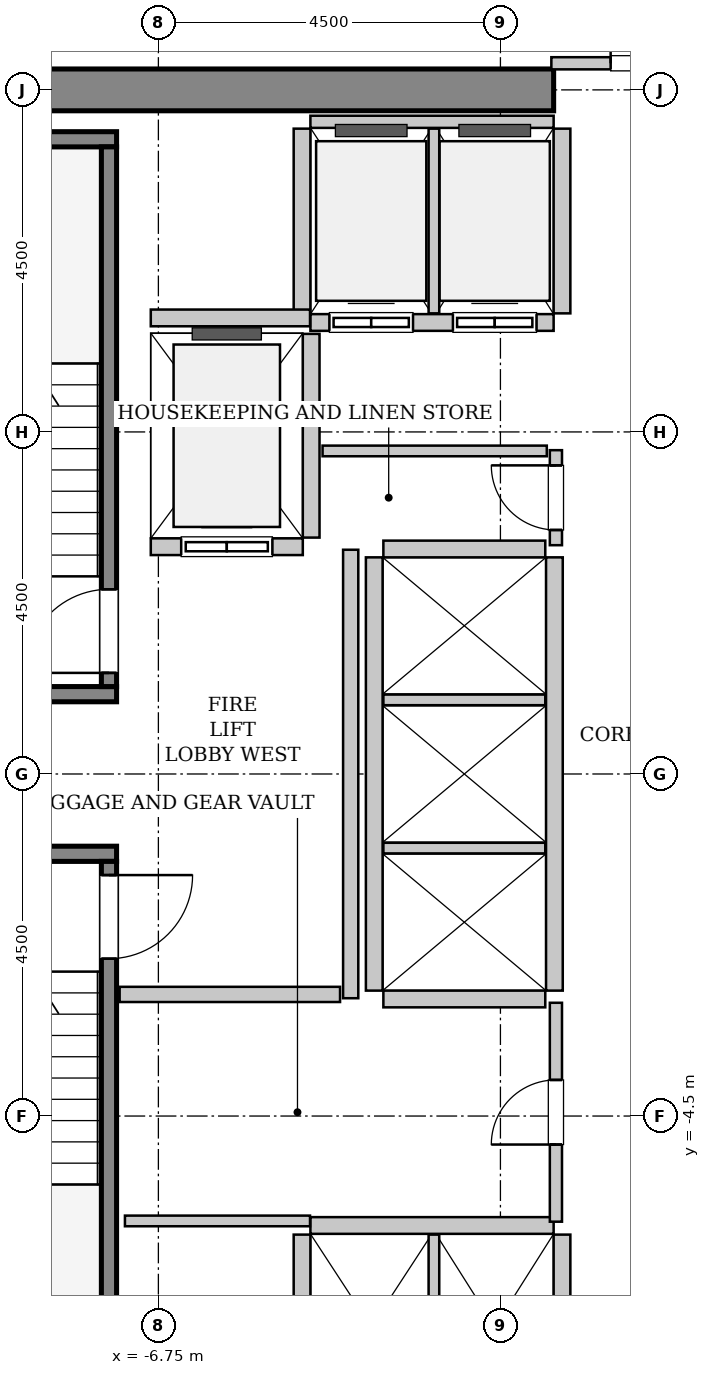
"""IFC4 building model, lengths in metres.
Left out: names, types, materials, properties, quantities, classifications, styles, units other than length and angle.
Written with IfcOpenShell. Run it as: python <this file> out.ifc"""

import sys

from ifc_helpers import new_model, si_unit, direction, frame, frame_2d, origin, place, context, subcontext, project, spatial, rectangle, extrude, source, transform, mapped, element, fill, save


model = new_model("IFC4")
c1 = context("Model", 3, precision=1e-05, world=origin(), true_north=direction((0.0, 1.0)))
c2 = subcontext(c1, "Body", "Model", "MODEL_VIEW")
j1 = project(units=[si_unit("LENGTHUNIT", "METRE"), si_unit("PLANEANGLEUNIT", "RADIAN")], contexts=[c1])
p1 = place(None, origin())
s1 = spatial("IfcSite", under=j1, at=p1, CompositionType="ELEMENT")
p2 = place(p1, origin())
s2 = spatial("IfcBuilding", under=s1, at=p2, CompositionType="ELEMENT")
p3 = place(p2, frame((0.0, 0.0, 128.8)))
s3 = spatial("IfcBuildingStorey", under=s2, at=p3, CompositionType="ELEMENT", Elevation=128.8)
m1 = source(origin(), c2, "Body", "SweptSolid", [
    extrude(rectangle(XDim=9.975, YDim=0.55, at=frame_2d((4.987, 0.0))), origin(), (0.0, 0.0, 1.0), 3.8),
])
p4 = place(p3, frame((-11.525, 9.0, 0.0), z_axis=(0.0, 0.0, 1.0), x_axis=(1.0, 0.0, 0.0)))
e1 = element("IfcWall", 1, at=p4, inside=s3, PredefinedType="SHEAR", context=c2, shape_type="MappedRepresentation", body=[
    mapped(m1, transform((0.0, 0.0, 0.0), x_axis=(1.0, 0.0, 0.0), y_axis=(0.0, 1.0, 0.0), z_axis=(0.0, 0.0, 1.0), scale=1.0)),
])
m2 = source(origin(), c2, "Body", "SweptSolid", [
    extrude(rectangle(XDim=3.4, YDim=0.2, at=frame_2d((1.7, 0.0))), origin(), (0.0, 0.0, 1.0), 3.8),
])
p5 = place(p3, frame((-7.3, 1.05, 0.0), z_axis=(0.0, 0.0, 1.0), x_axis=(-1.0, 0.0, 0.0)))
e2 = element("IfcWall", 2, at=p5, inside=s3, PredefinedType="SOLIDWALL", context=c2, shape_type="MappedRepresentation", body=[
    mapped(m2, transform((0.0, 0.0, 0.0), x_axis=(1.0, 0.0, 0.0), y_axis=(0.0, 1.0, 0.0), z_axis=(0.0, 0.0, 1.0), scale=1.0)),
])
m3 = source(origin(), c2, "Body", "SweptSolid", [
    extrude(rectangle(XDim=3.68, YDim=0.2, at=frame_2d((1.84, 0.0))), origin(), (0.0, 0.0, 1.0), 3.8),
])
p6 = place(p3, frame((-7.3, 8.35, 0.0), z_axis=(0.0, 0.0, 1.0), x_axis=(-1.0, 0.0, 0.0)))
e3 = element("IfcWall", 3, at=p6, inside=s3, PredefinedType="SOLIDWALL", context=c2, shape_type="MappedRepresentation", body=[
    mapped(m3, transform((0.0, 0.0, 0.0), x_axis=(1.0, 0.0, 0.0), y_axis=(0.0, 1.0, 0.0), z_axis=(0.0, 0.0, 1.0), scale=1.0)),
])
m4 = source(origin(), c2, "Body", "SweptSolid", [
    extrude(rectangle(XDim=7.1, YDim=0.2, at=frame_2d((3.55, 0.0))), origin(), (0.0, 0.0, 1.0), 3.8),
])
p7 = place(p3, frame((-7.4, 1.15, 0.0), z_axis=(0.0, 0.0, 1.0), x_axis=(0.0, 1.0, 0.0)))
e4 = element("IfcWall", 4, at=p7, inside=s3, PredefinedType="SOLIDWALL", context=c2, shape_type="MappedRepresentation", body=[
    mapped(m4, transform((0.0, 0.0, 0.0), x_axis=(1.0, 0.0, 0.0), y_axis=(0.0, 1.0, 0.0), z_axis=(0.0, 0.0, 1.0), scale=1.0)),
])
p8 = place(p7, frame((0.18, 0.0, 0.0)))
e5 = element("IfcOpeningElement", 5, at=p8, cuts=e4, PredefinedType="OPENING", context=c2, shape_type="SweptSolid", body=[
    extrude(rectangle(XDim=1.1, YDim=2.15, at=frame_2d((0.55, 1.075))), frame((0.0, 0.11, 0.0), z_axis=(0.0, -1.0, 0.0), x_axis=(1.0, 0.0, 0.0)), (0.0, 0.0, 1.0), 0.22),
])
p9 = place(p3, frame((-10.7, -1.05, 0.0), z_axis=(0.0, 0.0, 1.0), x_axis=(1.0, 0.0, 0.0)))
e6 = element("IfcWall", 6, at=p9, inside=s3, PredefinedType="SOLIDWALL", context=c2, shape_type="MappedRepresentation", body=[
    mapped(m2, transform((0.0, 0.0, 0.0), x_axis=(1.0, 0.0, 0.0), y_axis=(0.0, 1.0, 0.0), z_axis=(0.0, 0.0, 1.0), scale=1.0)),
])
p10 = place(p3, frame((-7.4, -1.15, 0.0), z_axis=(0.0, 0.0, 1.0), x_axis=(0.0, -1.0, 0.0)))
e7 = element("IfcWall", 7, at=p10, inside=s3, PredefinedType="SOLIDWALL", context=c2, shape_type="MappedRepresentation", body=[
    mapped(m4, transform((0.0, 0.0, 0.0), x_axis=(1.0, 0.0, 0.0), y_axis=(0.0, 1.0, 0.0), z_axis=(0.0, 0.0, 1.0), scale=1.0)),
])
p11 = place(p10, frame((0.18, 0.0, 0.0)))
e8 = element("IfcOpeningElement", 8, at=p11, cuts=e7, PredefinedType="OPENING", context=c2, shape_type="SweptSolid", body=[
    extrude(rectangle(XDim=1.1, YDim=2.15, at=frame_2d((0.55, 1.075))), frame((0.0, 0.11, 0.0), z_axis=(0.0, -1.0, 0.0), x_axis=(1.0, 0.0, 0.0)), (0.0, 0.0, 1.0), 0.22),
])
m5 = source(origin(), c2, "Body", "SweptSolid", [
    extrude(rectangle(XDim=2.0, YDim=0.22, at=frame_2d((1.0, 0.0))), origin(), (0.0, 0.0, 1.0), 3.535),
])
p12 = place(p3, frame((-6.85, 2.99, 0.0), z_axis=(0.0, 0.0, 1.0), x_axis=(1.0, 0.0, 0.0)))
e9 = element("IfcWall", 9, at=p12, inside=s3, PredefinedType="SOLIDWALL", context=c2, shape_type="MappedRepresentation", body=[
    mapped(m5, transform((0.0, 0.0, 0.0), x_axis=(1.0, 0.0, 0.0), y_axis=(0.0, 1.0, 0.0), z_axis=(0.0, 0.0, 1.0), scale=1.0)),
])
p13 = place(p12, frame((0.4, 0.0, 0.0)))
e10 = element("IfcOpeningElement", 10, at=p13, cuts=e9, PredefinedType="OPENING", context=c2, shape_type="SweptSolid", body=[
    extrude(rectangle(XDim=1.2, YDim=2.2, at=frame_2d((0.6, 1.1))), frame((0.0, 0.12, 0.0), z_axis=(0.0, -1.0, 0.0), x_axis=(1.0, 0.0, 0.0)), (0.0, 0.0, 1.0), 0.24),
])
m6 = source(origin(), c2, "Body", "SweptSolid", [
    extrude(rectangle(XDim=2.68, YDim=0.22, at=frame_2d((1.34, 0.0))), origin(), (0.0, 0.0, 1.0), 3.535),
])
p14 = place(p3, frame((-4.74, 3.11, 0.0), z_axis=(0.0, 0.0, 1.0), x_axis=(0.0, 1.0, 0.0)))
e11 = element("IfcWall", 11, at=p14, inside=s3, PredefinedType="SOLIDWALL", context=c2, shape_type="MappedRepresentation", body=[
    mapped(m6, transform((0.0, 0.0, 0.0), x_axis=(1.0, 0.0, 0.0), y_axis=(0.0, 1.0, 0.0), z_axis=(0.0, 0.0, 1.0), scale=1.0)),
])
m7 = source(origin(), c2, "Body", "SweptSolid", [
    extrude(rectangle(XDim=3.2, YDim=0.22, at=frame_2d((1.6, 0.0))), origin(), (0.0, 0.0, 1.0), 3.535),
])
p15 = place(p3, frame((-4.75, 5.94, 0.0), z_axis=(0.0, 0.0, 1.0), x_axis=(1.0, 0.0, 0.0)))
e12 = element("IfcWall", 12, at=p15, inside=s3, PredefinedType="SOLIDWALL", context=c2, shape_type="MappedRepresentation", body=[
    mapped(m7, transform((0.0, 0.0, 0.0), x_axis=(1.0, 0.0, 0.0), y_axis=(0.0, 1.0, 0.0), z_axis=(0.0, 0.0, 1.0), scale=1.0)),
])
p16 = place(p15, frame((0.25, 0.0, 0.0)))
e13 = element("IfcOpeningElement", 13, at=p16, cuts=e12, PredefinedType="OPENING", context=c2, shape_type="SweptSolid", body=[
    extrude(rectangle(XDim=1.1, YDim=2.2, at=frame_2d((0.55, 1.1))), frame((0.0, 0.12, 0.0), z_axis=(0.0, -1.0, 0.0), x_axis=(1.0, 0.0, 0.0)), (0.0, 0.0, 1.0), 0.24),
])
p17 = place(p15, frame((1.875, 0.0, 0.0)))
e14 = element("IfcOpeningElement", 14, at=p17, cuts=e12, PredefinedType="OPENING", context=c2, shape_type="SweptSolid", body=[
    extrude(rectangle(XDim=1.1, YDim=2.2, at=frame_2d((0.55, 1.1))), frame((0.0, 0.12, 0.0), z_axis=(0.0, -1.0, 0.0), x_axis=(1.0, 0.0, 0.0)), (0.0, 0.0, 1.0), 0.24),
])
m8 = source(origin(), c2, "Body", "SweptSolid", [
    extrude(rectangle(XDim=3.2, YDim=0.16, at=frame_2d((1.6, 0.0))), origin(), (0.0, 0.0, 1.0), 2.425),
])
p18 = place(p3, frame((-1.55, 8.58, 0.0), z_axis=(0.0, 0.0, 1.0), x_axis=(-1.0, 0.0, 0.0)))
e15 = element("IfcWall", 15, at=p18, inside=s3, PredefinedType="PARTITIONING", context=c2, shape_type="MappedRepresentation", body=[
    mapped(m8, transform((0.0, 0.0, 0.0), x_axis=(1.0, 0.0, 0.0), y_axis=(0.0, 1.0, 0.0), z_axis=(0.0, 0.0, 1.0), scale=1.0)),
])
m9 = source(origin(), c2, "Body", "SweptSolid", [
    extrude(rectangle(XDim=2.43, YDim=0.22, at=frame_2d((1.215, 0.0))), origin(), (0.0, 0.0, 1.0), 3.535),
])
p19 = place(p3, frame((-4.86, 8.49, 0.0), z_axis=(0.0, 0.0, 1.0), x_axis=(0.0, -1.0, 0.0)))
e16 = element("IfcWall", 16, at=p19, inside=s3, PredefinedType="SOLIDWALL", context=c2, shape_type="MappedRepresentation", body=[
    mapped(m9, transform((0.0, 0.0, 0.0), x_axis=(1.0, 0.0, 0.0), y_axis=(0.0, 1.0, 0.0), z_axis=(0.0, 0.0, 1.0), scale=1.0)),
])
m10 = source(origin(), c2, "Body", "SweptSolid", [
    extrude(rectangle(XDim=2.43, YDim=0.14, at=frame_2d((1.215, 0.0))), origin(), (0.0, 0.0, 1.0), 3.535),
])
p20 = place(p3, frame((-3.125, 6.06, 0.0), z_axis=(0.0, 0.0, 1.0), x_axis=(0.0, 1.0, 0.0)))
e17 = element("IfcWall", 17, at=p20, inside=s3, PredefinedType="PARTITIONING", context=c2, shape_type="MappedRepresentation", body=[
    mapped(m10, transform((0.0, 0.0, 0.0), x_axis=(1.0, 0.0, 0.0), y_axis=(0.0, 1.0, 0.0), z_axis=(0.0, 0.0, 1.0), scale=1.0)),
])
p21 = place(p3, frame((-1.44, 6.06, 0.0), z_axis=(0.0, 0.0, 1.0), x_axis=(0.0, 1.0, 0.0)))
e18 = element("IfcWall", 18, at=p21, inside=s3, PredefinedType="SOLIDWALL", context=c2, shape_type="MappedRepresentation", body=[
    mapped(m9, transform((0.0, 0.0, 0.0), x_axis=(1.0, 0.0, 0.0), y_axis=(0.0, 1.0, 0.0), z_axis=(0.0, 0.0, 1.0), scale=1.0)),
])
p22 = place(p3, frame((-1.55, -5.94, 0.0), z_axis=(0.0, 0.0, 1.0), x_axis=(-1.0, 0.0, 0.0)))
e19 = element("IfcWall", 19, at=p22, inside=s3, PredefinedType="SOLIDWALL", context=c2, shape_type="MappedRepresentation", body=[
    mapped(m7, transform((0.0, 0.0, 0.0), x_axis=(1.0, 0.0, 0.0), y_axis=(0.0, 1.0, 0.0), z_axis=(0.0, 0.0, 1.0), scale=1.0)),
])
p23 = place(p3, frame((-4.86, -6.06, 0.0), z_axis=(0.0, 0.0, 1.0), x_axis=(0.0, -1.0, 0.0)))
e20 = element("IfcWall", 20, at=p23, inside=s3, PredefinedType="SOLIDWALL", context=c2, shape_type="MappedRepresentation", body=[
    mapped(m9, transform((0.0, 0.0, 0.0), x_axis=(1.0, 0.0, 0.0), y_axis=(0.0, 1.0, 0.0), z_axis=(0.0, 0.0, 1.0), scale=1.0)),
])
p24 = place(p3, frame((-3.125, -8.49, 0.0), z_axis=(0.0, 0.0, 1.0), x_axis=(0.0, 1.0, 0.0)))
e21 = element("IfcWall", 21, at=p24, inside=s3, PredefinedType="PARTITIONING", context=c2, shape_type="MappedRepresentation", body=[
    mapped(m10, transform((0.0, 0.0, 0.0), x_axis=(1.0, 0.0, 0.0), y_axis=(0.0, 1.0, 0.0), z_axis=(0.0, 0.0, 1.0), scale=1.0)),
])
p25 = place(p3, frame((-1.44, -8.49, 0.0), z_axis=(0.0, 0.0, 1.0), x_axis=(0.0, 1.0, 0.0)))
e22 = element("IfcWall", 22, at=p25, inside=s3, PredefinedType="SOLIDWALL", context=c2, shape_type="MappedRepresentation", body=[
    mapped(m9, transform((0.0, 0.0, 0.0), x_axis=(1.0, 0.0, 0.0), y_axis=(0.0, 1.0, 0.0), z_axis=(0.0, 0.0, 1.0), scale=1.0)),
])
m11 = source(origin(), c2, "Body", "SweptSolid", [
    extrude(rectangle(XDim=5.7, YDim=0.22, at=frame_2d((2.85, 0.0))), origin(), (0.0, 0.0, 1.0), 3.535),
])
for number, where, z_axis, x_axis in (
    (23, (-1.54, -2.85, 0.0), (0.0, 0.0, 1.0), (0.0, 1.0, 0.0)),
    (24, (-3.91, 2.85, 0.0), (0.0, 0.0, 1.0), (0.0, -1.0, 0.0)),
):
    element("IfcWall", number, at=place(p3, frame(where, z_axis=z_axis, x_axis=x_axis)), inside=s3, PredefinedType="SOLIDWALL", context=c2, shape_type="MappedRepresentation", body=[
        mapped(m11, transform((0.0, 0.0, 0.0), x_axis=(1.0, 0.0, 0.0), y_axis=(0.0, 1.0, 0.0), z_axis=(0.0, 0.0, 1.0), scale=1.0)),
    ])
m12 = source(origin(), c2, "Body", "SweptSolid", [
    extrude(rectangle(XDim=2.13, YDim=0.22, at=frame_2d((1.065, 0.0))), origin(), (0.0, 0.0, 1.0), 3.535),
])
p26 = place(p3, frame((-3.79, -2.96, 0.0), z_axis=(0.0, 0.0, 1.0), x_axis=(1.0, 0.0, 0.0)))
e25 = element("IfcWall", 25, at=p26, inside=s3, PredefinedType="SOLIDWALL", context=c2, shape_type="MappedRepresentation", body=[
    mapped(m12, transform((0.0, 0.0, 0.0), x_axis=(1.0, 0.0, 0.0), y_axis=(0.0, 1.0, 0.0), z_axis=(0.0, 0.0, 1.0), scale=1.0)),
])
m13 = source(origin(), c2, "Body", "SweptSolid", [
    extrude(rectangle(XDim=2.13, YDim=0.14, at=frame_2d((1.065, 0.0))), origin(), (0.0, 0.0, 1.0), 3.535),
])
for number, where, z_axis, x_axis in (
    (26, (-3.79, -0.975, 0.0), (0.0, 0.0, 1.0), (1.0, 0.0, 0.0)),
    (27, (-3.79, 0.975, 0.0), (0.0, 0.0, 1.0), (1.0, 0.0, 0.0)),
):
    element("IfcWall", number, at=place(p3, frame(where, z_axis=z_axis, x_axis=x_axis)), inside=s3, PredefinedType="PARTITIONING", context=c2, shape_type="MappedRepresentation", body=[
        mapped(m13, transform((0.0, 0.0, 0.0), x_axis=(1.0, 0.0, 0.0), y_axis=(0.0, 1.0, 0.0), z_axis=(0.0, 0.0, 1.0), scale=1.0)),
    ])
p27 = place(p3, frame((-1.66, 2.96, 0.0), z_axis=(0.0, 0.0, 1.0), x_axis=(-1.0, 0.0, 0.0)))
e28 = element("IfcWall", 28, at=p27, inside=s3, PredefinedType="SOLIDWALL", context=c2, shape_type="MappedRepresentation", body=[
    mapped(m12, transform((0.0, 0.0, 0.0), x_axis=(1.0, 0.0, 0.0), y_axis=(0.0, 1.0, 0.0), z_axis=(0.0, 0.0, 1.0), scale=1.0)),
])
m14 = source(origin(), c2, "Body", "SweptSolid", [
    extrude(rectangle(XDim=2.095, YDim=0.22, at=frame_2d((1.048, 0.0))), origin(), (0.0, 0.0, 1.0), 3.535),
])
p28 = place(p3, frame((-6.85, 6.0, 0.0), z_axis=(0.0, 0.0, 1.0), x_axis=(1.0, 0.0, 0.0)))
e29 = element("IfcWall", 29, at=p28, inside=s3, PredefinedType="SOLIDWALL", context=c2, shape_type="MappedRepresentation", body=[
    mapped(m14, transform((0.0, 0.0, 0.0), x_axis=(1.0, 0.0, 0.0), y_axis=(0.0, 1.0, 0.0), z_axis=(0.0, 0.0, 1.0), scale=1.0)),
])
m15 = source(origin(), c2, "Body", "SweptSolid", [
    extrude(rectangle(XDim=5.9, YDim=0.2, at=frame_2d((2.95, 0.0))), origin(), (0.0, 0.0, 1.0), 3.535),
])
p29 = place(p3, frame((-4.22, -2.95, 0.0), z_axis=(0.0, 0.0, 1.0), x_axis=(0.0, 1.0, 0.0)))
e30 = element("IfcWall", 30, at=p29, inside=s3, PredefinedType="PARTITIONING", context=c2, shape_type="MappedRepresentation", body=[
    mapped(m15, transform((0.0, 0.0, 0.0), x_axis=(1.0, 0.0, 0.0), y_axis=(0.0, 1.0, 0.0), z_axis=(0.0, 0.0, 1.0), scale=1.0)),
])
m16 = source(origin(), c2, "Body", "SweptSolid", [
    extrude(rectangle(XDim=2.9, YDim=0.2, at=frame_2d((1.45, 0.0))), origin(), (0.0, 0.0, 1.0), 3.535),
])
p30 = place(p3, frame((-7.26, -2.9, 0.0), z_axis=(0.0, 0.0, 1.0), x_axis=(1.0, 0.0, 0.0)))
e31 = element("IfcWall", 31, at=p30, inside=s3, PredefinedType="PARTITIONING", context=c2, shape_type="MappedRepresentation", body=[
    mapped(m16, transform((0.0, 0.0, 0.0), x_axis=(1.0, 0.0, 0.0), y_axis=(0.0, 1.0, 0.0), z_axis=(0.0, 0.0, 1.0), scale=1.0)),
])
m17 = source(origin(), c2, "Body", "SweptSolid", [
    extrude(rectangle(XDim=3.16, YDim=0.16, at=frame_2d((1.58, 0.0))), origin(), (0.0, 0.0, 1.0), 2.425),
])
p31 = place(p3, frame((-1.58, 9.35, 0.0), z_axis=(0.0, 0.0, 1.0), x_axis=(1.0, 0.0, 0.0)))
e32 = element("IfcWall", 32, at=p31, inside=s3, PredefinedType="PARTITIONING", context=c2, shape_type="MappedRepresentation", body=[
    mapped(m17, transform((0.0, 0.0, 0.0), x_axis=(1.0, 0.0, 0.0), y_axis=(0.0, 1.0, 0.0), z_axis=(0.0, 0.0, 1.0), scale=1.0)),
])
p32 = place(p31, frame((0.78, 0.0, 0.0)))
e33 = element("IfcOpeningElement", 33, at=p32, cuts=e32, PredefinedType="OPENING", context=c2, shape_type="SweptSolid", body=[
    extrude(rectangle(XDim=1.6, YDim=2.3, at=frame_2d((0.8, 1.15))), frame((0.0, 0.09, 0.0), z_axis=(0.0, -1.0, 0.0), x_axis=(1.0, 0.0, 0.0)), (0.0, 0.0, 1.0), 0.18),
])
m18 = source(origin(), c2, "Body", "SweptSolid", [
    extrude(rectangle(XDim=1.25, YDim=0.16, at=frame_2d((0.625, 0.0))), origin(), (0.0, 0.0, 1.0), 3.535),
])
p33 = place(p3, frame((-1.52, 3.01, 0.0), z_axis=(0.0, 0.0, 1.0), x_axis=(0.0, 1.0, 0.0)))
e34 = element("IfcWall", 34, at=p33, inside=s3, PredefinedType="PARTITIONING", context=c2, shape_type="MappedRepresentation", body=[
    mapped(m18, transform((0.0, 0.0, 0.0), x_axis=(1.0, 0.0, 0.0), y_axis=(0.0, 1.0, 0.0), z_axis=(0.0, 0.0, 1.0), scale=1.0)),
])
p34 = place(p33, frame((0.2, 0.0, 0.0)))
e35 = element("IfcOpeningElement", 35, at=p34, cuts=e34, PredefinedType="OPENING", context=c2, shape_type="SweptSolid", body=[
    extrude(rectangle(XDim=0.85, YDim=2.1, at=frame_2d((0.425, 1.05))), frame((0.0, 0.09, 0.0), z_axis=(0.0, -1.0, 0.0), x_axis=(1.0, 0.0, 0.0)), (0.0, 0.0, 1.0), 0.18),
])
m19 = source(origin(), c2, "Body", "SweptSolid", [
    extrude(rectangle(XDim=2.95, YDim=0.14, at=frame_2d((1.475, 0.0))), origin(), (0.0, 0.0, 1.0), 3.535),
])
p35 = place(p3, frame((-4.59, 4.25, 0.0), z_axis=(0.0, 0.0, 1.0), x_axis=(1.0, 0.0, 0.0)))
e36 = element("IfcWall", 36, at=p35, inside=s3, PredefinedType="PARTITIONING", context=c2, shape_type="MappedRepresentation", body=[
    mapped(m19, transform((0.0, 0.0, 0.0), x_axis=(1.0, 0.0, 0.0), y_axis=(0.0, 1.0, 0.0), z_axis=(0.0, 0.0, 1.0), scale=1.0)),
])
m20 = source(origin(), c2, "Body", "SweptSolid", [
    extrude(rectangle(XDim=2.88, YDim=0.16, at=frame_2d((1.44, 0.0))), origin(), (0.0, 0.0, 1.0), 3.535),
])
p36 = place(p3, frame((-1.52, -5.89, 0.0), z_axis=(0.0, 0.0, 1.0), x_axis=(0.0, 1.0, 0.0)))
e37 = element("IfcWall", 37, at=p36, inside=s3, PredefinedType="PARTITIONING", context=c2, shape_type="MappedRepresentation", body=[
    mapped(m20, transform((0.0, 0.0, 0.0), x_axis=(1.0, 0.0, 0.0), y_axis=(0.0, 1.0, 0.0), z_axis=(0.0, 0.0, 1.0), scale=1.0)),
])
p37 = place(p36, frame((1.015, 0.0, 0.0)))
e38 = element("IfcOpeningElement", 38, at=p37, cuts=e37, PredefinedType="OPENING", context=c2, shape_type="SweptSolid", body=[
    extrude(rectangle(XDim=0.85, YDim=2.1, at=frame_2d((0.425, 1.05))), frame((0.0, 0.09, 0.0), z_axis=(0.0, -1.0, 0.0), x_axis=(1.0, 0.0, 0.0)), (0.0, 0.0, 1.0), 0.18),
])
m21 = source(origin(), c2, "Body", "SweptSolid", [
    extrude(rectangle(XDim=2.435, YDim=0.14, at=frame_2d((1.218, 0.0))), origin(), (0.0, 0.0, 1.0), 3.535),
])
p38 = place(p3, frame((-7.19, -5.88, 0.0), z_axis=(0.0, 0.0, 1.0), x_axis=(1.0, 0.0, 0.0)))
e39 = element("IfcWall", 39, at=p38, inside=s3, PredefinedType="PARTITIONING", context=c2, shape_type="MappedRepresentation", body=[
    mapped(m21, transform((0.0, 0.0, 0.0), x_axis=(1.0, 0.0, 0.0), y_axis=(0.0, 1.0, 0.0), z_axis=(0.0, 0.0, 1.0), scale=1.0)),
])
m22 = source(origin(), c2, "Body", "SweptSolid", [
    extrude(rectangle(XDim=1.1, YDim=2.15, at=frame_2d((0.55, 1.075))), frame((0.0, 0.025, 0.0), z_axis=(0.0, -1.0, 0.0), x_axis=(1.0, 0.0, 0.0)), (0.0, 0.0, 1.0), 0.05),
])
p39 = place(p8, origin())
e40 = element("IfcDoor", 40, at=p39, inside=s3, OperationType="SINGLE_SWING_LEFT", PredefinedType="DOOR", context=c2, shape_type="MappedRepresentation", body=[
    mapped(m22, transform((0.0, 0.0, 0.0), x_axis=(1.0, 0.0, 0.0), y_axis=(0.0, 1.0, 0.0), z_axis=(0.0, 0.0, 1.0), scale=1.0)),
])
fill(e5, e40)
p40 = place(p11, origin())
e41 = element("IfcDoor", 41, at=p40, inside=s3, OperationType="SINGLE_SWING_LEFT", PredefinedType="DOOR", context=c2, shape_type="MappedRepresentation", body=[
    mapped(m22, transform((0.0, 0.0, 0.0), x_axis=(1.0, 0.0, 0.0), y_axis=(0.0, 1.0, 0.0), z_axis=(0.0, 0.0, 1.0), scale=1.0)),
])
fill(e8, e41)
m23 = source(origin(), c2, "Body", "SweptSolid", [
    extrude(rectangle(XDim=1.2, YDim=2.2, at=frame_2d((0.6, 1.1))), frame((0.0, 0.025, 0.0), z_axis=(0.0, -1.0, 0.0), x_axis=(1.0, 0.0, 0.0)), (0.0, 0.0, 1.0), 0.05),
])
p41 = place(p13, origin())
e42 = element("IfcDoor", 42, at=p41, inside=s3, OperationType="SLIDING_TO_LEFT", PredefinedType="DOOR", context=c2, shape_type="MappedRepresentation", body=[
    mapped(m23, transform((0.0, 0.0, 0.0), x_axis=(1.0, 0.0, 0.0), y_axis=(0.0, 1.0, 0.0), z_axis=(0.0, 0.0, 1.0), scale=1.0)),
])
fill(e10, e42)
m24 = source(origin(), c2, "Body", "SweptSolid", [
    extrude(rectangle(XDim=1.1, YDim=2.2, at=frame_2d((0.55, 1.1))), frame((0.0, 0.025, 0.0), z_axis=(0.0, -1.0, 0.0), x_axis=(1.0, 0.0, 0.0)), (0.0, 0.0, 1.0), 0.05),
])
p42 = place(p16, origin())
e43 = element("IfcDoor", 43, at=p42, inside=s3, OperationType="DOUBLE_DOOR_SLIDING", PredefinedType="DOOR", context=c2, shape_type="MappedRepresentation", body=[
    mapped(m24, transform((0.0, 0.0, 0.0), x_axis=(1.0, 0.0, 0.0), y_axis=(0.0, 1.0, 0.0), z_axis=(0.0, 0.0, 1.0), scale=1.0)),
])
fill(e13, e43)
p43 = place(p17, origin())
e44 = element("IfcDoor", 44, at=p43, inside=s3, OperationType="DOUBLE_DOOR_SLIDING", PredefinedType="DOOR", context=c2, shape_type="MappedRepresentation", body=[
    mapped(m24, transform((0.0, 0.0, 0.0), x_axis=(1.0, 0.0, 0.0), y_axis=(0.0, 1.0, 0.0), z_axis=(0.0, 0.0, 1.0), scale=1.0)),
])
fill(e14, e44)
m25 = source(origin(), c2, "Body", "SweptSolid", [
    extrude(rectangle(XDim=1.6, YDim=2.3, at=frame_2d((0.8, 1.15))), frame((0.0, 0.025, 0.0), z_axis=(0.0, -1.0, 0.0), x_axis=(1.0, 0.0, 0.0)), (0.0, 0.0, 1.0), 0.05),
])
p44 = place(p32, origin())
e45 = element("IfcDoor", 45, at=p44, inside=s3, OperationType="DOUBLE_DOOR_SINGLE_SWING", PredefinedType="DOOR", context=c2, shape_type="MappedRepresentation", body=[
    mapped(m25, transform((0.0, 0.0, 0.0), x_axis=(1.0, 0.0, 0.0), y_axis=(0.0, 1.0, 0.0), z_axis=(0.0, 0.0, 1.0), scale=1.0)),
])
fill(e33, e45)
m26 = source(origin(), c2, "Body", "SweptSolid", [
    extrude(rectangle(XDim=0.85, YDim=2.1, at=frame_2d((0.425, 1.05))), frame((0.0, 0.025, 0.0), z_axis=(0.0, -1.0, 0.0), x_axis=(1.0, 0.0, 0.0)), (0.0, 0.0, 1.0), 0.05),
])
p45 = place(p34, origin())
e46 = element("IfcDoor", 46, at=p45, inside=s3, OperationType="SINGLE_SWING_RIGHT", PredefinedType="DOOR", context=c2, shape_type="MappedRepresentation", body=[
    mapped(m26, transform((0.0, 0.0, 0.0), x_axis=(1.0, 0.0, 0.0), y_axis=(0.0, 1.0, 0.0), z_axis=(0.0, 0.0, 1.0), scale=1.0)),
])
fill(e35, e46)
p46 = place(p37, origin())
e47 = element("IfcDoor", 47, at=p46, inside=s3, OperationType="SINGLE_SWING_LEFT", PredefinedType="DOOR", context=c2, shape_type="MappedRepresentation", body=[
    mapped(m26, transform((0.0, 0.0, 0.0), x_axis=(1.0, 0.0, 0.0), y_axis=(0.0, 1.0, 0.0), z_axis=(0.0, 0.0, 1.0), scale=1.0)),
])
fill(e38, e47)
save(model, sys.argv[1])
